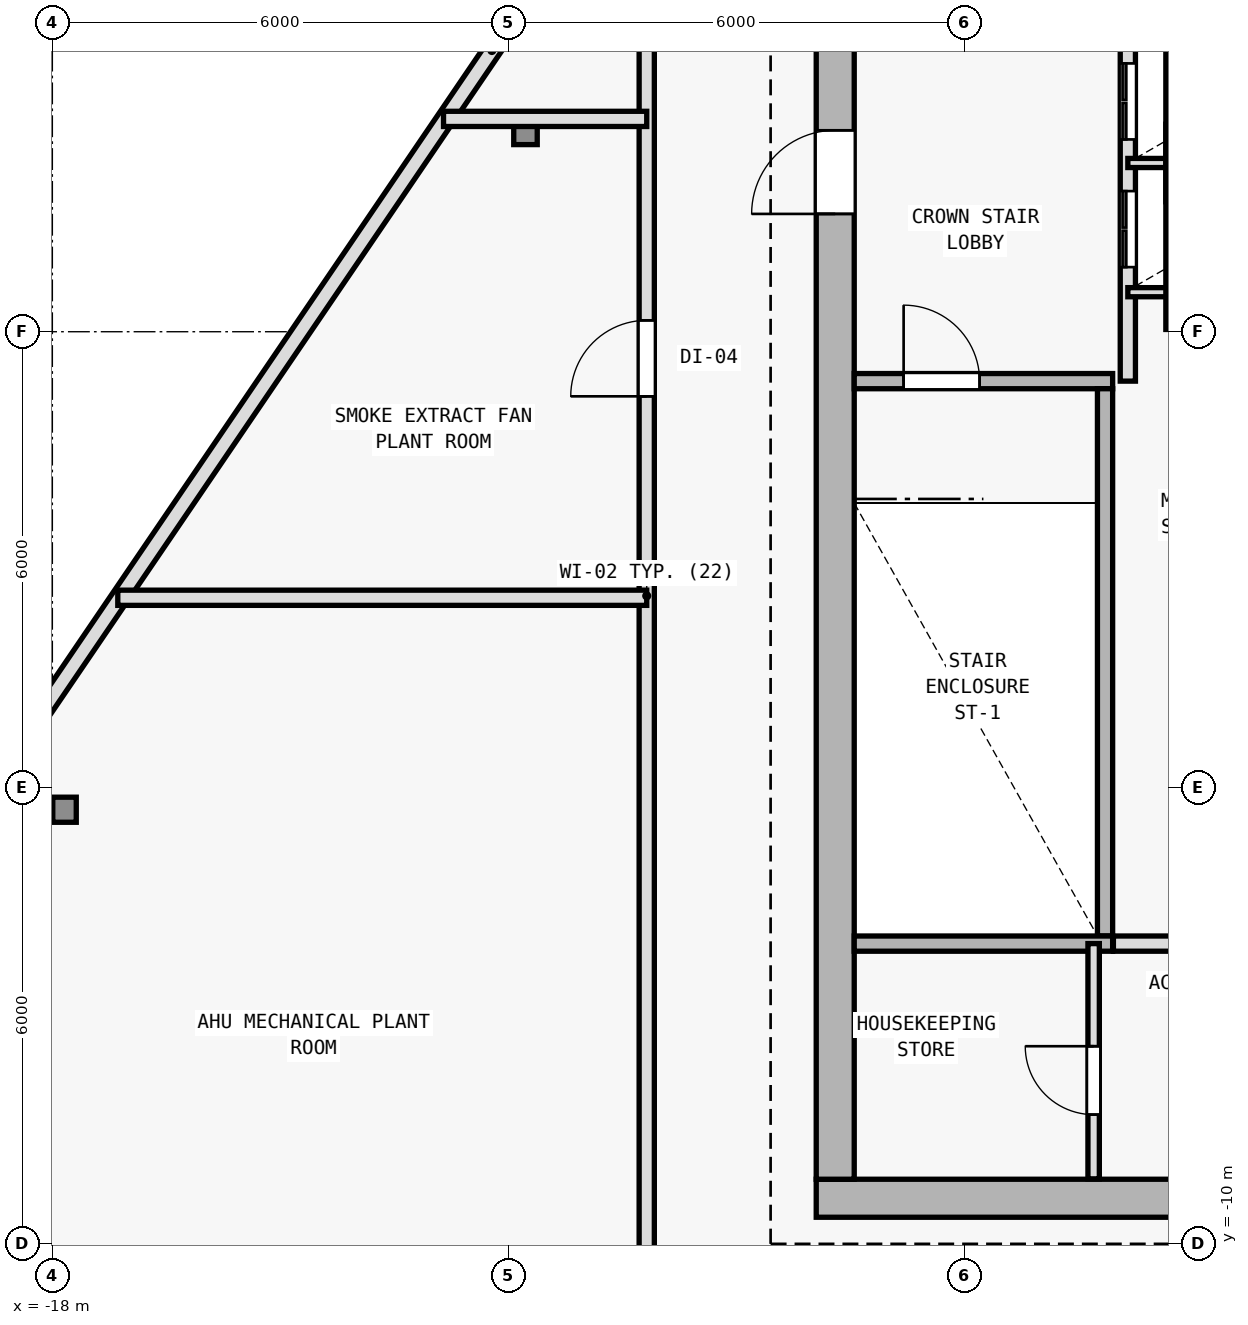
"""IFC4 building model, lengths in metres.
Left out: names, types, materials, properties, quantities, classifications, styles, units other than length and angle.
Written with IfcOpenShell. Run it as: python <this file> out.ifc"""

import sys

from ifc_helpers import new_model, si_unit, direction, frame, frame_2d, origin, origin_2d, place, context, subcontext, project, spatial, rectangle, i_section, extrude, element, fill, save


model = new_model("IFC4")
c1 = context("Model", 3, precision=1e-05, world=origin(), true_north=direction((0.0, 1.0)))
c2 = subcontext(c1, "Body", "Model", "MODEL_VIEW")
j1 = project(units=[si_unit("LENGTHUNIT", "METRE"), si_unit("PLANEANGLEUNIT", "RADIAN")], contexts=[c1])
p1 = place(None, origin())
s1 = spatial("IfcSite", under=j1, at=p1, CompositionType="ELEMENT")
p2 = place(p1, origin())
s2 = spatial("IfcBuilding", under=s1, at=p2, CompositionType="ELEMENT")
p3 = place(p2, frame((0.0, 0.0, 319.2)))
s3 = spatial("IfcBuildingStorey", under=s2, at=p3, CompositionType="ELEMENT", Elevation=319.2)
for number, where, z_axis, x_axis in (
    (1, (-7.7, -9.4, 0.0), (0.0, 0.0, 1.0), (1.0, 0.0, 0.0)),
    (2, (-7.7, 2.0, 0.0), (0.0, 0.0, 1.0), (1.0, 0.0, 0.0)),
):
    element("IfcColumn", number, at=place(p3, frame(where, z_axis=z_axis, x_axis=x_axis)), inside=s3, PredefinedType="COLUMN", context=c2, shape_type="SweptSolid", body=[
        extrude(i_section(OverallWidth=0.374, OverallDepth=0.372, WebThickness=0.012, FlangeThickness=0.02, FilletRadius=0.015, at=origin_2d()), origin(), (0.0, 0.0, 1.0), 3.6),
    ])
p4 = place(p3, frame((-17.84, -4.289, 0.0), z_axis=(0.0, 0.0, 1.0), x_axis=(1.0, 0.0, 0.0)))
e3 = element("IfcColumn", 3, at=p4, inside=s3, PredefinedType="COLUMN", context=c2, shape_type="SweptSolid", body=[
    extrude(i_section(OverallWidth=0.309, OverallDepth=0.33, WebThickness=0.011, FlangeThickness=0.019, FilletRadius=0.027, at=origin_2d()), origin(), (0.0, 0.0, 1.0), 1.23),
])
p5 = place(p3, frame((-11.775, 4.627, 0.0), z_axis=(0.0, 0.0, 1.0), x_axis=(1.0, 0.0, 0.0)))
e4 = element("IfcColumn", 4, at=p5, inside=s3, PredefinedType="COLUMN", context=c2, shape_type="SweptSolid", body=[
    extrude(i_section(OverallWidth=0.309, OverallDepth=0.33, WebThickness=0.011, FlangeThickness=0.019, FilletRadius=0.027, at=origin_2d()), origin(), (0.0, 0.0, 1.0), 2.564),
])
p6 = place(p3, frame((-22.517, -9.441, 0.0), z_axis=(0.0, 0.0, 1.0), x_axis=(0.562470833944, 0.826817126675, 0.0)))
e5 = element("IfcWall", 5, at=p6, inside=s3, PredefinedType="SOLIDWALL", context=c2, shape_type="SweptSolid", body=[
    extrude(rectangle(XDim=36.623, YDim=0.22, at=frame_2d((18.312, 0.0))), origin(), (0.0, 0.0, 1.0), 2.447),
])
p7 = place(p3, frame((-7.95, -9.4, 0.0), z_axis=(0.0, 0.0, 1.0), x_axis=(1.0, 0.0, 0.0)))
e6 = element("IfcWall", 6, at=p7, inside=s3, PredefinedType="SHEAR", context=c2, shape_type="SweptSolid", body=[
    extrude(rectangle(XDim=15.9, YDim=0.5, at=frame_2d((7.95, 0.0))), origin(), (0.0, 0.0, 1.0), 2.4),
])
p8 = place(p7, frame((9.6, 0.0, 0.0)))
e7 = element("IfcOpeningElement", 7, at=p8, cuts=e6, PredefinedType="OPENING", context=c2, shape_type="SweptSolid", body=[
    extrude(rectangle(XDim=1.5, YDim=2.2, at=frame_2d((0.75, 1.1))), frame((0.0, 0.26, 0.0), z_axis=(0.0, -1.0, 0.0), x_axis=(1.0, 0.0, 0.0)), (0.0, 0.0, 1.0), 0.52),
])
p9 = place(p3, frame((-7.7, -9.15, 0.0), z_axis=(0.0, 0.0, 1.0), x_axis=(0.0, 1.0, 0.0)))
e8 = element("IfcWall", 8, at=p9, inside=s3, PredefinedType="SHEAR", context=c2, shape_type="SweptSolid", body=[
    extrude(rectangle(XDim=19.1, YDim=0.5, at=frame_2d((9.55, 0.0))), origin(), (0.0, 0.0, 1.0), 2.4),
])
p10 = place(p9, frame((12.7, 0.0, 0.0)))
e9 = element("IfcOpeningElement", 9, at=p10, cuts=e8, PredefinedType="OPENING", context=c2, shape_type="SweptSolid", body=[
    extrude(rectangle(XDim=1.1, YDim=2.15, at=frame_2d((0.55, 1.075))), frame((0.0, 0.26, 0.0), z_axis=(0.0, -1.0, 0.0), x_axis=(1.0, 0.0, 0.0)), (0.0, 0.0, 1.0), 0.52),
])
p11 = place(p3, frame((-7.45, 1.35, 0.0), z_axis=(0.0, 0.0, 1.0), x_axis=(1.0, 0.0, 0.0)))
e10 = element("IfcWall", 10, at=p11, inside=s3, PredefinedType="SOLIDWALL", context=c2, shape_type="SweptSolid", body=[
    extrude(rectangle(XDim=3.4, YDim=0.2, at=frame_2d((1.7, 0.0))), origin(), (0.0, 0.0, 1.0), 2.4),
])
p12 = place(p11, frame((0.65, 0.0, 0.0)))
e11 = element("IfcOpeningElement", 11, at=p12, cuts=e10, PredefinedType="OPENING", context=c2, shape_type="SweptSolid", body=[
    extrude(rectangle(XDim=1.0, YDim=2.15, at=frame_2d((0.5, 1.075))), frame((0.0, 0.11, 0.0), z_axis=(0.0, -1.0, 0.0), x_axis=(1.0, 0.0, 0.0)), (0.0, 0.0, 1.0), 0.22),
])
p13 = place(p3, frame((-4.15, -5.95, 0.0), z_axis=(0.0, 0.0, 1.0), x_axis=(0.0, 1.0, 0.0)))
e12 = element("IfcWall", 12, at=p13, inside=s3, PredefinedType="SOLIDWALL", context=c2, shape_type="SweptSolid", body=[
    extrude(rectangle(XDim=7.2, YDim=0.2, at=frame_2d((3.6, 0.0))), origin(), (0.0, 0.0, 1.0), 2.4),
])
p14 = place(p3, frame((-3.85, 1.35, 0.0), z_axis=(0.0, 0.0, 1.0), x_axis=(0.0, 1.0, 0.0)))
e13 = element("IfcWall", 13, at=p14, inside=s3, PredefinedType="SOLIDWALL", context=c2, shape_type="SweptSolid", body=[
    extrude(rectangle(XDim=8.595, YDim=0.2, at=frame_2d((4.297, 0.0))), origin(), (0.0, 0.0, 1.0), 2.4),
])
p15 = place(p14, frame((1.5, 0.0, 0.0)))
e14 = element("IfcOpeningElement", 14, at=p15, cuts=e13, PredefinedType="OPENING", context=c2, shape_type="SweptSolid", body=[
    extrude(rectangle(XDim=1.0, YDim=2.15, at=frame_2d((0.5, 1.075))), frame((0.0, 0.11, 0.0), z_axis=(0.0, -1.0, 0.0), x_axis=(1.0, 0.0, 0.0)), (0.0, 0.0, 1.0), 0.22),
])
p16 = place(p14, frame((3.18, 0.0, 0.0)))
e15 = element("IfcOpeningElement", 15, at=p16, cuts=e13, PredefinedType="OPENING", context=c2, shape_type="SweptSolid", body=[
    extrude(rectangle(XDim=1.0, YDim=2.15, at=frame_2d((0.5, 1.075))), frame((0.0, 0.11, 0.0), z_axis=(0.0, -1.0, 0.0), x_axis=(1.0, 0.0, 0.0)), (0.0, 0.0, 1.0), 0.22),
])
for number, where, z_axis, x_axis in (
    (16, (-3.85, 2.52, 0.0), (0.0, 0.0, 1.0), (1.0, 0.0, 0.0)),
    (17, (-3.85, 4.22, 0.0), (0.0, 0.0, 1.0), (1.0, 0.0, 0.0)),
):
    element("IfcWall", number, at=place(p3, frame(where, z_axis=z_axis, x_axis=x_axis)), inside=s3, PredefinedType="PARTITIONING", context=c2, shape_type="SweptSolid", body=[
        extrude(rectangle(XDim=2.9, YDim=0.12, at=frame_2d((1.45, 0.0))), origin(), (0.0, 0.0, 1.0), 2.4),
    ])
p17 = place(p3, frame((-7.45, -6.05, 0.0), z_axis=(0.0, 0.0, 1.0), x_axis=(1.0, 0.0, 0.0)))
e18 = element("IfcWall", 18, at=p17, inside=s3, PredefinedType="SOLIDWALL", context=c2, shape_type="SweptSolid", body=[
    extrude(rectangle(XDim=3.4, YDim=0.2, at=frame_2d((1.7, 0.0))), origin(), (0.0, 0.0, 1.0), 2.4),
])
p18 = place(p3, frame((-4.04, -6.05, 0.0), z_axis=(0.0, 0.0, 1.0), x_axis=(1.0, 0.0, 0.0)))
e19 = element("IfcWall", 19, at=p18, inside=s3, PredefinedType="SOLIDWALL", context=c2, shape_type="SweptSolid", body=[
    extrude(rectangle(XDim=2.79, YDim=0.2, at=frame_2d((1.395, 0.0))), origin(), (0.0, 0.0, 1.0), 2.4),
])
p19 = place(p3, frame((-4.3, -9.145, 0.0), z_axis=(0.0, 0.0, 1.0), x_axis=(0.0, 1.0, 0.0)))
e20 = element("IfcWall", 20, at=p19, inside=s3, PredefinedType="PARTITIONING", context=c2, shape_type="SweptSolid", body=[
    extrude(rectangle(XDim=3.095, YDim=0.15, at=frame_2d((1.547, 0.0))), origin(), (0.0, 0.0, 1.0), 2.4),
])
p20 = place(p19, frame((0.845, 0.0, 0.0)))
e21 = element("IfcOpeningElement", 21, at=p20, cuts=e20, PredefinedType="OPENING", context=c2, shape_type="SweptSolid", body=[
    extrude(rectangle(XDim=0.9, YDim=2.1, at=frame_2d((0.45, 1.05))), frame((0.0, 0.085, 0.0), z_axis=(0.0, -1.0, 0.0), x_axis=(1.0, 0.0, 0.0)), (0.0, 0.0, 1.0), 0.17),
])
p21 = place(p3, frame((-10.18, -11.68, 0.0), z_axis=(0.0, 0.0, 1.0), x_axis=(0.0, 1.0, 0.0)))
e22 = element("IfcWall", 22, at=p21, inside=s3, PredefinedType="SOLIDWALL", context=c2, shape_type="SweptSolid", body=[
    extrude(rectangle(XDim=20.41, YDim=0.2, at=frame_2d((10.205, 0.0))), origin(), (0.0, 0.0, 1.0), 2.4),
])
p22 = place(p21, frame((12.83, 0.0, 0.0)))
e23 = element("IfcOpeningElement", 23, at=p22, cuts=e22, PredefinedType="OPENING", context=c2, shape_type="SweptSolid", body=[
    extrude(rectangle(XDim=1.0, YDim=2.15, at=frame_2d((0.5, 1.075))), frame((0.0, 0.11, 0.0), z_axis=(0.0, -1.0, 0.0), x_axis=(1.0, 0.0, 0.0)), (0.0, 0.0, 1.0), 0.22),
])
p23 = place(p3, frame((-17.139, -1.5, 0.0), z_axis=(0.0, 0.0, 1.0), x_axis=(1.0, 0.0, 0.0)))
e24 = element("IfcWall", 24, at=p23, inside=s3, PredefinedType="SOLIDWALL", context=c2, shape_type="SweptSolid", body=[
    extrude(rectangle(XDim=6.959, YDim=0.2, at=frame_2d((3.48, 0.0))), origin(), (0.0, 0.0, 1.0), 2.4),
])
p24 = place(p3, frame((-12.854, 4.8, 0.0), z_axis=(0.0, 0.0, 1.0), x_axis=(1.0, 0.0, 0.0)))
e25 = element("IfcWall", 25, at=p24, inside=s3, PredefinedType="SOLIDWALL", context=c2, shape_type="SweptSolid", body=[
    extrude(rectangle(XDim=2.674, YDim=0.2, at=frame_2d((1.337, 0.0))), origin(), (0.0, 0.0, 1.0), 2.4),
])
p25 = place(p10, origin())
e26 = element("IfcDoor", 26, at=p25, inside=s3, OperationType="SINGLE_SWING_LEFT", PredefinedType="DOOR", context=c2, shape_type="SweptSolid", body=[
    extrude(rectangle(XDim=1.1, YDim=2.15, at=frame_2d((0.55, 1.075))), frame((0.0, 0.025, 0.0), z_axis=(0.0, -1.0, 0.0), x_axis=(1.0, 0.0, 0.0)), (0.0, 0.0, 1.0), 0.05),
])
fill(e9, e26)
p26 = place(p12, origin())
e27 = element("IfcDoor", 27, at=p26, inside=s3, OperationType="SINGLE_SWING_LEFT", PredefinedType="DOOR", context=c2, shape_type="SweptSolid", body=[
    extrude(rectangle(XDim=1.0, YDim=2.15, at=frame_2d((0.5, 1.075))), frame((0.0, 0.025, 0.0), z_axis=(0.0, -1.0, 0.0), x_axis=(1.0, 0.0, 0.0)), (0.0, 0.0, 1.0), 0.05),
])
fill(e11, e27)
p27 = place(p15, origin())
e28 = element("IfcDoor", 28, at=p27, inside=s3, OperationType="DOUBLE_DOOR_SLIDING", PredefinedType="DOOR", context=c2, shape_type="SweptSolid", body=[
    extrude(rectangle(XDim=1.0, YDim=2.15, at=frame_2d((0.5, 1.075))), frame((0.0, 0.025, 0.0), z_axis=(0.0, -1.0, 0.0), x_axis=(1.0, 0.0, 0.0)), (0.0, 0.0, 1.0), 0.05),
])
fill(e14, e28)
p28 = place(p16, origin())
e29 = element("IfcDoor", 29, at=p28, inside=s3, OperationType="DOUBLE_DOOR_SLIDING", PredefinedType="DOOR", context=c2, shape_type="SweptSolid", body=[
    extrude(rectangle(XDim=1.0, YDim=2.15, at=frame_2d((0.5, 1.075))), frame((0.0, 0.025, 0.0), z_axis=(0.0, -1.0, 0.0), x_axis=(1.0, 0.0, 0.0)), (0.0, 0.0, 1.0), 0.05),
])
fill(e15, e29)
p29 = place(p20, origin())
e30 = element("IfcDoor", 30, at=p29, inside=s3, OperationType="SINGLE_SWING_RIGHT", PredefinedType="DOOR", context=c2, shape_type="SweptSolid", body=[
    extrude(rectangle(XDim=0.9, YDim=2.1, at=frame_2d((0.45, 1.05))), frame((0.0, 0.025, 0.0), z_axis=(0.0, -1.0, 0.0), x_axis=(1.0, 0.0, 0.0)), (0.0, 0.0, 1.0), 0.05),
])
fill(e21, e30)
p30 = place(p22, origin())
e31 = element("IfcDoor", 31, at=p30, inside=s3, OperationType="SINGLE_SWING_LEFT", PredefinedType="DOOR", context=c2, shape_type="SweptSolid", body=[
    extrude(rectangle(XDim=1.0, YDim=2.15, at=frame_2d((0.5, 1.075))), frame((0.0, 0.025, 0.0), z_axis=(0.0, -1.0, 0.0), x_axis=(1.0, 0.0, 0.0)), (0.0, 0.0, 1.0), 0.05),
])
fill(e23, e31)
save(model, sys.argv[1])
